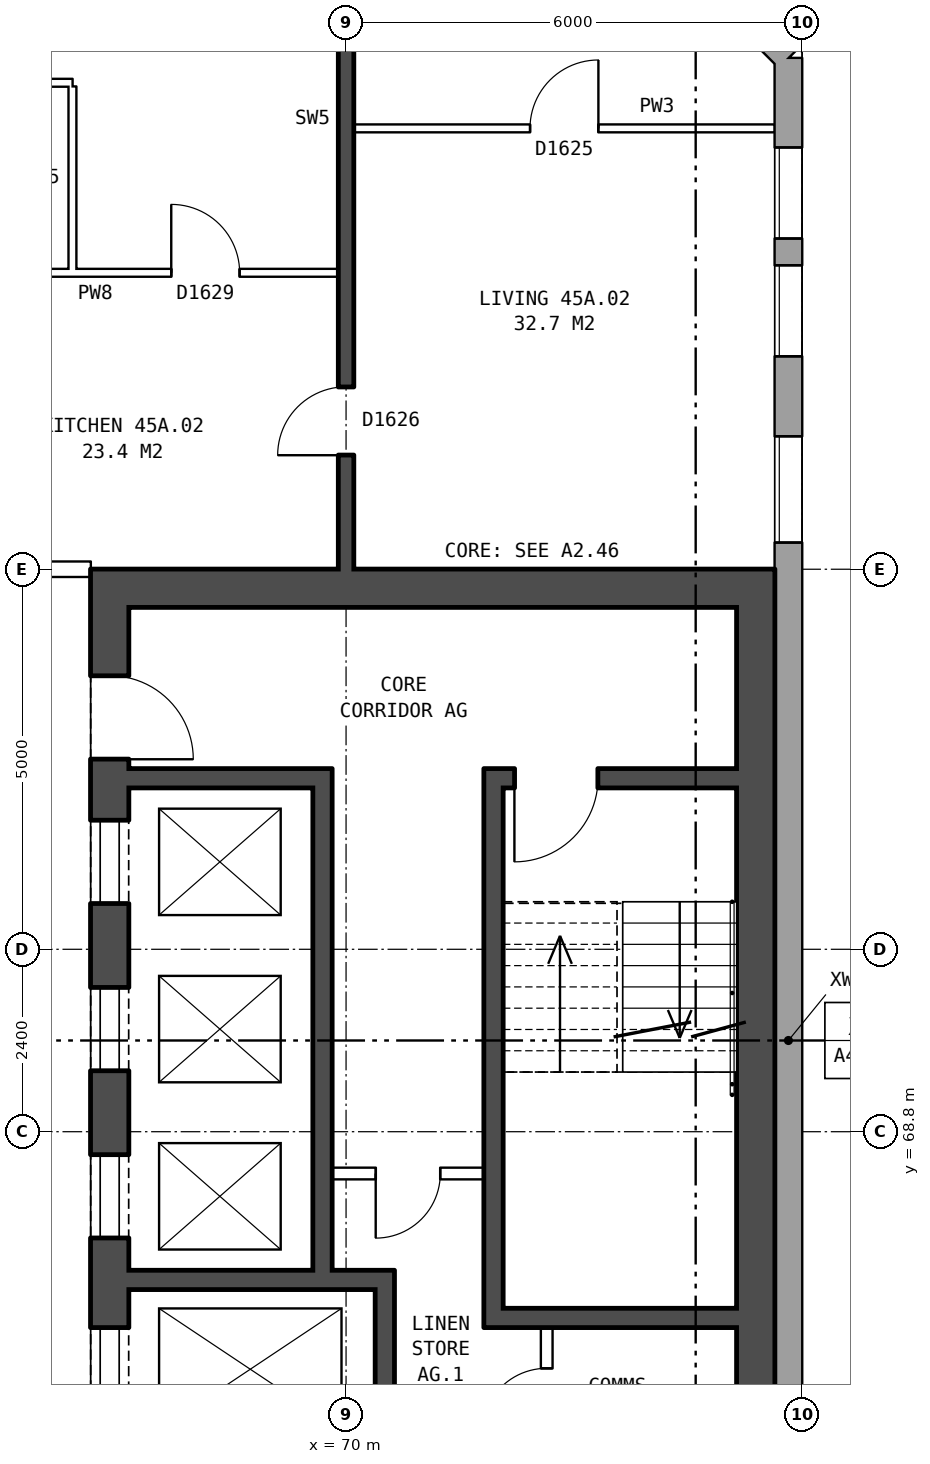
"""IFC4 building model, lengths in metres.
Left out: names, types, materials, properties, quantities, classifications, styles, units other than length and angle.
Written with IfcOpenShell. Run it as: python <this file> out.ifc"""

import sys

from ifc_helpers import new_model, si_unit, direction, frame, frame_2d, origin, place, context, subcontext, project, spatial, rectangle, extrude, element, fill, save


model = new_model("IFC4")
c1 = context("Model", 3, precision=1e-05, world=origin(), true_north=direction((0.0, 1.0)))
c2 = subcontext(c1, "Body", "Model", "MODEL_VIEW")
j1 = project(units=[si_unit("LENGTHUNIT", "METRE"), si_unit("PLANEANGLEUNIT", "RADIAN")], contexts=[c1])
p1 = place(None, origin())
s1 = spatial("IfcSite", under=j1, at=p1, CompositionType="ELEMENT")
p2 = place(p1, origin())
s2 = spatial("IfcBuilding", under=s1, at=p2, CompositionType="ELEMENT")
p3 = place(p2, frame((0.0, 0.0, 160.9)))
s3 = spatial("IfcBuildingStorey", under=s2, at=p3, CompositionType="ELEMENT", Elevation=160.9)
p4 = place(p3, frame((75.82, 57.075, 0.0), z_axis=(0.0, 0.0, 1.0), x_axis=(0.0, 1.0, 0.0)))
e1 = element("IfcWall", 1, at=p4, inside=s3, PredefinedType="STANDARD", context=c2, shape_type="SweptSolid", body=[
    extrude(rectangle(XDim=25.851, YDim=0.36, at=frame_2d((12.925, 0.0))), origin(), (0.0, 0.0, 1.0), 2.85),
])
p5 = place(p4, frame((1.075, 0.0, 0.8)))
e2 = element("IfcOpeningElement", 2, at=p5, cuts=e1, PredefinedType="OPENING", context=c2, shape_type="SweptSolid", body=[
    extrude(rectangle(XDim=1.2, YDim=1.8, at=frame_2d((0.6, 0.9))), frame((0.0, 0.19, 0.0), z_axis=(0.0, -1.0, 0.0), x_axis=(1.0, 0.0, 0.0)), (0.0, 0.0, 1.0), 0.38),
])
p6 = place(p4, frame((2.575, 0.0, 0.8)))
e3 = element("IfcOpeningElement", 3, at=p6, cuts=e1, PredefinedType="OPENING", context=c2, shape_type="SweptSolid", body=[
    extrude(rectangle(XDim=1.2, YDim=0.9, at=frame_2d((0.6, 0.45))), frame((0.0, 0.19, 0.0), z_axis=(0.0, -1.0, 0.0), x_axis=(1.0, 0.0, 0.0)), (0.0, 0.0, 1.0), 0.38),
])
p7 = place(p4, frame((19.475, 0.0, 1.7)))
e4 = element("IfcOpeningElement", 4, at=p7, cuts=e1, PredefinedType="OPENING", context=c2, shape_type="SweptSolid", body=[
    extrude(rectangle(XDim=1.4, YDim=0.9, at=frame_2d((0.7, 0.45))), frame((0.0, 0.19, 0.0), z_axis=(0.0, -1.0, 0.0), x_axis=(1.0, 0.0, 0.0)), (0.0, 0.0, 1.0), 0.38),
])
p8 = place(p4, frame((21.925, 0.0, 0.8)))
e5 = element("IfcOpeningElement", 5, at=p8, cuts=e1, PredefinedType="OPENING", context=c2, shape_type="SweptSolid", body=[
    extrude(rectangle(XDim=1.2, YDim=0.9, at=frame_2d((0.6, 0.45))), frame((0.0, 0.19, 0.0), z_axis=(0.0, -1.0, 0.0), x_axis=(1.0, 0.0, 0.0)), (0.0, 0.0, 1.0), 0.38),
])
p9 = place(p4, frame((4.975, 0.0, 1.7)))
e6 = element("IfcOpeningElement", 6, at=p9, cuts=e1, PredefinedType="OPENING", context=c2, shape_type="SweptSolid", body=[
    extrude(rectangle(XDim=1.4, YDim=0.9, at=frame_2d((0.7, 0.45))), frame((0.0, 0.19, 0.0), z_axis=(0.0, -1.0, 0.0), x_axis=(1.0, 0.0, 0.0)), (0.0, 0.0, 1.0), 0.38),
])
p10 = place(p4, frame((23.475, 0.0, 0.8)))
e7 = element("IfcOpeningElement", 7, at=p10, cuts=e1, PredefinedType="OPENING", context=c2, shape_type="SweptSolid", body=[
    extrude(rectangle(XDim=1.2, YDim=1.8, at=frame_2d((0.6, 0.9))), frame((0.0, 0.19, 0.0), z_axis=(0.0, -1.0, 0.0), x_axis=(1.0, 0.0, 0.0)), (0.0, 0.0, 1.0), 0.38),
])
p11 = place(p3, frame((75.82, 82.925, 0.0), z_axis=(0.0, 0.0, 1.0), x_axis=(-0.707106781187, 0.707106781187, 0.0)))
e8 = element("IfcWall", 8, at=p11, inside=s3, PredefinedType="STANDARD", context=c2, shape_type="SweptSolid", body=[
    extrude(rectangle(XDim=4.094, YDim=0.36, at=frame_2d((2.047, 0.0))), origin(), (0.0, 0.0, 1.0), 2.85),
])
p12 = place(p11, frame((1.247, 0.0, 0.8)))
e9 = element("IfcOpeningElement", 9, at=p12, cuts=e8, PredefinedType="OPENING", context=c2, shape_type="SweptSolid", body=[
    extrude(rectangle(XDim=1.6, YDim=1.8, at=frame_2d((0.8, 0.9))), frame((0.0, 0.19, 0.0), z_axis=(0.0, -1.0, 0.0), x_axis=(1.0, 0.0, 0.0)), (0.0, 0.0, 1.0), 0.38),
])
p13 = place(p3, frame((66.89, 63.8, 0.0), z_axis=(0.0, 0.0, 1.0), x_axis=(0.0, 1.0, 0.0)))
e10 = element("IfcWall", 10, at=p13, inside=s3, PredefinedType="SHEAR", context=c2, shape_type="SweptSolid", body=[
    extrude(rectangle(XDim=12.4, YDim=0.5, at=frame_2d((6.2, 0.0))), origin(), (0.0, 0.0, 1.0), 2.85),
])
p14 = place(p13, frame((1.325, 0.0, 0.0)))
e11 = element("IfcOpeningElement", 11, at=p14, cuts=e10, PredefinedType="OPENING", context=c2, shape_type="SweptSolid", body=[
    extrude(rectangle(XDim=1.1, YDim=2.1, at=frame_2d((0.55, 1.05))), frame((0.0, 0.26, 0.0), z_axis=(0.0, -1.0, 0.0), x_axis=(1.0, 0.0, 0.0)), (0.0, 0.0, 1.0), 0.52),
])
p15 = place(p13, frame((3.6, 0.0, 0.0)))
e12 = element("IfcOpeningElement", 12, at=p15, cuts=e10, PredefinedType="OPENING", context=c2, shape_type="SweptSolid", body=[
    extrude(rectangle(XDim=1.1, YDim=2.1, at=frame_2d((0.55, 1.05))), frame((0.0, 0.26, 0.0), z_axis=(0.0, -1.0, 0.0), x_axis=(1.0, 0.0, 0.0)), (0.0, 0.0, 1.0), 0.52),
])
p16 = place(p13, frame((5.8, 0.0, 0.0)))
e13 = element("IfcOpeningElement", 13, at=p16, cuts=e10, PredefinedType="OPENING", context=c2, shape_type="SweptSolid", body=[
    extrude(rectangle(XDim=1.1, YDim=2.1, at=frame_2d((0.55, 1.05))), frame((0.0, 0.26, 0.0), z_axis=(0.0, -1.0, 0.0), x_axis=(1.0, 0.0, 0.0)), (0.0, 0.0, 1.0), 0.52),
])
p17 = place(p13, frame((8.0, 0.0, 0.0)))
e14 = element("IfcOpeningElement", 14, at=p17, cuts=e10, PredefinedType="OPENING", context=c2, shape_type="SweptSolid", body=[
    extrude(rectangle(XDim=1.1, YDim=2.1, at=frame_2d((0.55, 1.05))), frame((0.0, 0.26, 0.0), z_axis=(0.0, -1.0, 0.0), x_axis=(1.0, 0.0, 0.0)), (0.0, 0.0, 1.0), 0.52),
])
p18 = place(p13, frame((9.9, 0.0, 0.0)))
e15 = element("IfcOpeningElement", 15, at=p18, cuts=e10, PredefinedType="OPENING", context=c2, shape_type="SweptSolid", body=[
    extrude(rectangle(XDim=1.1, YDim=2.1, at=frame_2d((0.55, 1.05))), frame((0.0, 0.26, 0.0), z_axis=(0.0, -1.0, 0.0), x_axis=(1.0, 0.0, 0.0)), (0.0, 0.0, 1.0), 0.52),
])
p19 = place(p3, frame((75.39, 63.8, 0.0), z_axis=(0.0, 0.0, 1.0), x_axis=(0.0, 1.0, 0.0)))
e16 = element("IfcWall", 16, at=p19, inside=s3, PredefinedType="SHEAR", context=c2, shape_type="SweptSolid", body=[
    extrude(rectangle(XDim=12.4, YDim=0.5, at=frame_2d((6.2, 0.0))), origin(), (0.0, 0.0, 1.0), 2.85),
])
p20 = place(p3, frame((67.14, 75.95, 0.0), z_axis=(0.0, 0.0, 1.0), x_axis=(1.0, 0.0, 0.0)))
e17 = element("IfcWall", 17, at=p20, inside=s3, PredefinedType="SHEAR", context=c2, shape_type="SweptSolid", body=[
    extrude(rectangle(XDim=8.0, YDim=0.5, at=frame_2d((4.0, 0.0))), origin(), (0.0, 0.0, 1.0), 2.85),
])
p21 = place(p3, frame((72.065, 66.35, 0.0), z_axis=(0.0, 0.0, 1.0), x_axis=(1.0, 0.0, 0.0)))
e18 = element("IfcWall", 18, at=p21, inside=s3, PredefinedType="SHEAR", context=c2, shape_type="SweptSolid", body=[
    extrude(rectangle(XDim=3.075, YDim=0.25, at=frame_2d((1.538, 0.0))), origin(), (0.0, 0.0, 1.0), 2.85),
])
p22 = place(p3, frame((67.14, 66.85, 0.0), z_axis=(0.0, 0.0, 1.0), x_axis=(1.0, 0.0, 0.0)))
e19 = element("IfcWall", 19, at=p22, inside=s3, PredefinedType="SHEAR", context=c2, shape_type="SweptSolid", body=[
    extrude(rectangle(XDim=3.495, YDim=0.25, at=frame_2d((1.748, 0.0))), origin(), (0.0, 0.0, 1.0), 2.85),
])
p23 = place(p3, frame((69.815, 68.25, 0.0), z_axis=(0.0, 0.0, 1.0), x_axis=(1.0, 0.0, 0.0)))
e20 = element("IfcWall", 20, at=p23, inside=s3, PredefinedType="PARTITIONING", context=c2, shape_type="SweptSolid", body=[
    extrude(rectangle(XDim=2.0, YDim=0.15, at=frame_2d((1.0, 0.0))), origin(), (0.0, 0.0, 1.0), 2.85),
])
p24 = place(p23, frame((0.575, 0.0, 0.0)))
e21 = element("IfcOpeningElement", 21, at=p24, cuts=e20, PredefinedType="OPENING", context=c2, shape_type="SweptSolid", body=[
    extrude(rectangle(XDim=0.85, YDim=2.1, at=frame_2d((0.425, 1.05))), frame((0.0, 0.085, 0.0), z_axis=(0.0, -1.0, 0.0), x_axis=(1.0, 0.0, 0.0)), (0.0, 0.0, 1.0), 0.17),
])
p25 = place(p3, frame((67.14, 73.45, 0.0), z_axis=(0.0, 0.0, 1.0), x_axis=(1.0, 0.0, 0.0)))
e22 = element("IfcWall", 22, at=p25, inside=s3, PredefinedType="SHEAR", context=c2, shape_type="SweptSolid", body=[
    extrude(rectangle(XDim=2.425, YDim=0.25, at=frame_2d((1.212, 0.0))), origin(), (0.0, 0.0, 1.0), 2.85),
])
p26 = place(p3, frame((72.065, 73.45, 0.0), z_axis=(0.0, 0.0, 1.0), x_axis=(1.0, 0.0, 0.0)))
e23 = element("IfcWall", 23, at=p26, inside=s3, PredefinedType="SHEAR", context=c2, shape_type="SweptSolid", body=[
    extrude(rectangle(XDim=3.075, YDim=0.25, at=frame_2d((1.538, 0.0))), origin(), (0.0, 0.0, 1.0), 2.85),
])
p27 = place(p26, frame((0.15, 0.0, 0.0)))
e24 = element("IfcOpeningElement", 24, at=p27, cuts=e23, PredefinedType="OPENING", context=c2, shape_type="SweptSolid", body=[
    extrude(rectangle(XDim=1.1, YDim=2.1, at=frame_2d((0.55, 1.05))), frame((0.0, 0.135, 0.0), z_axis=(0.0, -1.0, 0.0), x_axis=(1.0, 0.0, 0.0)), (0.0, 0.0, 1.0), 0.27),
])
p28 = place(p3, frame((69.69, 66.975, 0.0), z_axis=(0.0, 0.0, 1.0), x_axis=(0.0, 1.0, 0.0)))
e25 = element("IfcWall", 25, at=p28, inside=s3, PredefinedType="SHEAR", context=c2, shape_type="SweptSolid", body=[
    extrude(rectangle(XDim=6.6, YDim=0.25, at=frame_2d((3.3, 0.0))), origin(), (0.0, 0.0, 1.0), 2.85),
])
p29 = place(p3, frame((70.51, 64.3, 0.0), z_axis=(0.0, 0.0, 1.0), x_axis=(0.0, 1.0, 0.0)))
e26 = element("IfcWall", 26, at=p29, inside=s3, PredefinedType="SHEAR", context=c2, shape_type="SweptSolid", body=[
    extrude(rectangle(XDim=2.425, YDim=0.25, at=frame_2d((1.212, 0.0))), origin(), (0.0, 0.0, 1.0), 2.85),
])
p30 = place(p3, frame((71.94, 66.225, 0.0), z_axis=(0.0, 0.0, 1.0), x_axis=(0.0, 1.0, 0.0)))
e27 = element("IfcWall", 27, at=p30, inside=s3, PredefinedType="SHEAR", context=c2, shape_type="SweptSolid", body=[
    extrude(rectangle(XDim=7.35, YDim=0.25, at=frame_2d((3.675, 0.0))), origin(), (0.0, 0.0, 1.0), 2.85),
])
p31 = place(p3, frame((72.64, 64.3, 0.0), z_axis=(0.0, 0.0, 1.0), x_axis=(0.0, 1.0, 0.0)))
e28 = element("IfcWall", 28, at=p31, inside=s3, PredefinedType="PARTITIONING", context=c2, shape_type="SweptSolid", body=[
    extrude(rectangle(XDim=1.925, YDim=0.15, at=frame_2d((0.962, 0.0))), origin(), (0.0, 0.0, 1.0), 2.85),
])
p32 = place(p31, frame((0.538, 0.0, 0.0)))
e29 = element("IfcOpeningElement", 29, at=p32, cuts=e28, PredefinedType="OPENING", context=c2, shape_type="SweptSolid", body=[
    extrude(rectangle(XDim=0.85, YDim=2.1, at=frame_2d((0.425, 1.05))), frame((0.0, 0.085, 0.0), z_axis=(0.0, -1.0, 0.0), x_axis=(1.0, 0.0, 0.0)), (0.0, 0.0, 1.0), 0.17),
])
p33 = place(p3, frame((63.64, 76.2, 0.0), z_axis=(0.0, 0.0, 1.0), x_axis=(1.0, 0.0, 0.0)))
e30 = element("IfcWall", 30, at=p33, inside=s3, PredefinedType="PARTITIONING", context=c2, shape_type="SweptSolid", body=[
    extrude(rectangle(XDim=3.0, YDim=0.2, at=frame_2d((1.5, 0.0))), origin(), (0.0, 0.0, 1.0), 2.85),
])
p34 = place(p33, frame((1.18, 0.0, 0.0)))
e31 = element("IfcOpeningElement", 31, at=p34, cuts=e30, PredefinedType="OPENING", context=c2, shape_type="SweptSolid", body=[
    extrude(rectangle(XDim=1.0, YDim=2.1, at=frame_2d((0.5, 1.05))), frame((0.0, 0.11, 0.0), z_axis=(0.0, -1.0, 0.0), x_axis=(1.0, 0.0, 0.0)), (0.0, 0.0, 1.0), 0.22),
])
p35 = place(p3, frame((64.1, 80.1, 0.0), z_axis=(0.0, 0.0, 1.0), x_axis=(1.0, 0.0, 0.0)))
e32 = element("IfcWall", 32, at=p35, inside=s3, PredefinedType="PARTITIONING", context=c2, shape_type="SweptSolid", body=[
    extrude(rectangle(XDim=5.8, YDim=0.1, at=frame_2d((2.9, 0.0))), origin(), (0.0, 0.0, 1.0), 2.85),
])
p36 = place(p35, frame((3.6, 0.0, 0.0)))
e33 = element("IfcOpeningElement", 33, at=p36, cuts=e32, PredefinedType="OPENING", context=c2, shape_type="SweptSolid", body=[
    extrude(rectangle(XDim=0.9, YDim=2.1, at=frame_2d((0.45, 1.05))), frame((0.0, 0.06, 0.0), z_axis=(0.0, -1.0, 0.0), x_axis=(1.0, 0.0, 0.0)), (0.0, 0.0, 1.0), 0.12),
])
p37 = place(p35, frame((0.7, 0.0, 0.0)))
e34 = element("IfcOpeningElement", 34, at=p37, cuts=e32, PredefinedType="OPENING", context=c2, shape_type="SweptSolid", body=[
    extrude(rectangle(XDim=0.9, YDim=2.1, at=frame_2d((0.45, 1.05))), frame((0.0, 0.06, 0.0), z_axis=(0.0, -1.0, 0.0), x_axis=(1.0, 0.0, 0.0)), (0.0, 0.0, 1.0), 0.12),
])
p38 = place(p3, frame((70.1, 82.0, 0.0), z_axis=(0.0, 0.0, 1.0), x_axis=(1.0, 0.0, 0.0)))
e35 = element("IfcWall", 35, at=p38, inside=s3, PredefinedType="PARTITIONING", context=c2, shape_type="SweptSolid", body=[
    extrude(rectangle(XDim=5.54, YDim=0.1, at=frame_2d((2.77, 0.0))), origin(), (0.0, 0.0, 1.0), 2.85),
])
p39 = place(p38, frame((2.32, 0.0, 0.0)))
e36 = element("IfcOpeningElement", 36, at=p39, cuts=e35, PredefinedType="OPENING", context=c2, shape_type="SweptSolid", body=[
    extrude(rectangle(XDim=0.9, YDim=2.1, at=frame_2d((0.45, 1.05))), frame((0.0, 0.06, 0.0), z_axis=(0.0, -1.0, 0.0), x_axis=(1.0, 0.0, 0.0)), (0.0, 0.0, 1.0), 0.12),
])
p40 = place(p3, frame((64.1, 82.6, 0.0), z_axis=(0.0, 0.0, 1.0), x_axis=(1.0, 0.0, 0.0)))
e37 = element("IfcWall", 37, at=p40, inside=s3, PredefinedType="PARTITIONING", context=c2, shape_type="SweptSolid", body=[
    extrude(rectangle(XDim=2.3, YDim=0.1, at=frame_2d((1.15, 0.0))), origin(), (0.0, 0.0, 1.0), 2.85),
])
p41 = place(p3, frame((66.4, 80.15, 0.0), z_axis=(0.0, 0.0, 1.0), x_axis=(0.0, 1.0, 0.0)))
e38 = element("IfcWall", 38, at=p41, inside=s3, PredefinedType="PARTITIONING", context=c2, shape_type="SweptSolid", body=[
    extrude(rectangle(XDim=2.4, YDim=0.1, at=frame_2d((1.2, 0.0))), origin(), (0.0, 0.0, 1.0), 2.85),
])
p42 = place(p3, frame((70.0, 76.2, 0.0), z_axis=(0.0, 0.0, 1.0), x_axis=(0.0, 1.0, 0.0)))
e39 = element("IfcWall", 39, at=p42, inside=s3, PredefinedType="SOLIDWALL", context=c2, shape_type="SweptSolid", body=[
    extrude(rectangle(XDim=9.44, YDim=0.2, at=frame_2d((4.72, 0.0))), origin(), (0.0, 0.0, 1.0), 2.85),
])
p43 = place(p42, frame((1.5, 0.0, 0.0)))
e40 = element("IfcOpeningElement", 40, at=p43, cuts=e39, PredefinedType="OPENING", context=c2, shape_type="SweptSolid", body=[
    extrude(rectangle(XDim=0.9, YDim=2.1, at=frame_2d((0.45, 1.05))), frame((0.0, 0.11, 0.0), z_axis=(0.0, -1.0, 0.0), x_axis=(1.0, 0.0, 0.0)), (0.0, 0.0, 1.0), 0.22),
])
p44 = place(p7, origin())
e41 = element("IfcWindow", 41, at=p44, inside=s3, PartitioningType="SINGLE_PANEL", PredefinedType="WINDOW", context=c2, shape_type="SweptSolid", body=[
    extrude(rectangle(XDim=1.4, YDim=0.9, at=frame_2d((0.7, 0.45))), frame((0.0, 0.15, 0.0), z_axis=(0.0, -1.0, 0.0), x_axis=(1.0, 0.0, 0.0)), (0.0, 0.0, 1.0), 0.06),
])
fill(e4, e41)
p45 = place(p8, origin())
e42 = element("IfcWindow", 42, at=p45, inside=s3, PartitioningType="SINGLE_PANEL", PredefinedType="WINDOW", context=c2, shape_type="SweptSolid", body=[
    extrude(rectangle(XDim=1.2, YDim=0.9, at=frame_2d((0.6, 0.45))), frame((0.0, 0.15, 0.0), z_axis=(0.0, -1.0, 0.0), x_axis=(1.0, 0.0, 0.0)), (0.0, 0.0, 1.0), 0.06),
])
fill(e5, e42)
p46 = place(p14, origin())
e43 = element("IfcDoor", 43, at=p46, inside=s3, OperationType="DOUBLE_DOOR_SLIDING", PredefinedType="DOOR", context=c2, shape_type="SweptSolid", body=[
    extrude(rectangle(XDim=1.1, YDim=2.1, at=frame_2d((0.55, 1.05))), frame((0.0, -0.185, 0.0), z_axis=(0.0, -1.0, 0.0), x_axis=(1.0, 0.0, 0.0)), (0.0, 0.0, 1.0), 0.05),
])
fill(e11, e43)
p47 = place(p15, origin())
e44 = element("IfcDoor", 44, at=p47, inside=s3, OperationType="DOUBLE_DOOR_SLIDING", PredefinedType="DOOR", context=c2, shape_type="SweptSolid", body=[
    extrude(rectangle(XDim=1.1, YDim=2.1, at=frame_2d((0.55, 1.05))), frame((0.0, -0.185, 0.0), z_axis=(0.0, -1.0, 0.0), x_axis=(1.0, 0.0, 0.0)), (0.0, 0.0, 1.0), 0.05),
])
fill(e12, e44)
p48 = place(p16, origin())
e45 = element("IfcDoor", 45, at=p48, inside=s3, OperationType="DOUBLE_DOOR_SLIDING", PredefinedType="DOOR", context=c2, shape_type="SweptSolid", body=[
    extrude(rectangle(XDim=1.1, YDim=2.1, at=frame_2d((0.55, 1.05))), frame((0.0, -0.185, 0.0), z_axis=(0.0, -1.0, 0.0), x_axis=(1.0, 0.0, 0.0)), (0.0, 0.0, 1.0), 0.05),
])
fill(e13, e45)
p49 = place(p17, origin())
e46 = element("IfcDoor", 46, at=p49, inside=s3, OperationType="DOUBLE_DOOR_SLIDING", PredefinedType="DOOR", context=c2, shape_type="SweptSolid", body=[
    extrude(rectangle(XDim=1.1, YDim=2.1, at=frame_2d((0.55, 1.05))), frame((0.0, -0.185, 0.0), z_axis=(0.0, -1.0, 0.0), x_axis=(1.0, 0.0, 0.0)), (0.0, 0.0, 1.0), 0.05),
])
fill(e14, e46)
p50 = place(p18, frame((1.1, 0.0, 0.0), z_axis=(0.0, 0.0, 1.0), x_axis=(-1.0, 0.0, 0.0)))
e47 = element("IfcDoor", 47, at=p50, inside=s3, OperationType="SINGLE_SWING_RIGHT", PredefinedType="DOOR", context=c2, shape_type="SweptSolid", body=[
    extrude(rectangle(XDim=1.1, YDim=2.1, at=frame_2d((0.55, 1.05))), frame((0.0, 0.235, 0.0), z_axis=(0.0, -1.0, 0.0), x_axis=(1.0, 0.0, 0.0)), (0.0, 0.0, 1.0), 0.05),
])
fill(e15, e47)
p51 = place(p27, frame((1.1, 0.0, 0.0), z_axis=(0.0, 0.0, 1.0), x_axis=(-1.0, 0.0, 0.0)))
e48 = element("IfcDoor", 48, at=p51, inside=s3, OperationType="SINGLE_SWING_RIGHT", PredefinedType="DOOR", context=c2, shape_type="SweptSolid", body=[
    extrude(rectangle(XDim=1.1, YDim=2.1, at=frame_2d((0.55, 1.05))), frame((0.0, 0.025, 0.0), z_axis=(0.0, -1.0, 0.0), x_axis=(1.0, 0.0, 0.0)), (0.0, 0.0, 1.0), 0.05),
])
fill(e24, e48)
p52 = place(p24, frame((0.85, 0.0, 0.0), z_axis=(0.0, 0.0, 1.0), x_axis=(-1.0, 0.0, 0.0)))
e49 = element("IfcDoor", 49, at=p52, inside=s3, OperationType="SINGLE_SWING_RIGHT", PredefinedType="DOOR", context=c2, shape_type="SweptSolid", body=[
    extrude(rectangle(XDim=0.85, YDim=2.1, at=frame_2d((0.425, 1.05))), frame((0.0, 0.025, 0.0), z_axis=(0.0, -1.0, 0.0), x_axis=(1.0, 0.0, 0.0)), (0.0, 0.0, 1.0), 0.05),
])
fill(e21, e49)
p53 = place(p32, origin())
e50 = element("IfcDoor", 50, at=p53, inside=s3, OperationType="SINGLE_SWING_LEFT", PredefinedType="DOOR", context=c2, shape_type="SweptSolid", body=[
    extrude(rectangle(XDim=0.85, YDim=2.1, at=frame_2d((0.425, 1.05))), frame((0.0, 0.025, 0.0), z_axis=(0.0, -1.0, 0.0), x_axis=(1.0, 0.0, 0.0)), (0.0, 0.0, 1.0), 0.05),
])
fill(e29, e50)
p54 = place(p36, origin())
e51 = element("IfcDoor", 51, at=p54, inside=s3, OperationType="SINGLE_SWING_LEFT", PredefinedType="DOOR", context=c2, shape_type="SweptSolid", body=[
    extrude(rectangle(XDim=0.9, YDim=2.1, at=frame_2d((0.45, 1.05))), frame((0.0, 0.025, 0.0), z_axis=(0.0, -1.0, 0.0), x_axis=(1.0, 0.0, 0.0)), (0.0, 0.0, 1.0), 0.05),
])
fill(e33, e51)
p55 = place(p39, origin())
e52 = element("IfcDoor", 52, at=p55, inside=s3, OperationType="SINGLE_SWING_RIGHT", PredefinedType="DOOR", context=c2, shape_type="SweptSolid", body=[
    extrude(rectangle(XDim=0.9, YDim=2.1, at=frame_2d((0.45, 1.05))), frame((0.0, 0.025, 0.0), z_axis=(0.0, -1.0, 0.0), x_axis=(1.0, 0.0, 0.0)), (0.0, 0.0, 1.0), 0.05),
])
fill(e36, e52)
p56 = place(p43, origin())
e53 = element("IfcDoor", 53, at=p56, inside=s3, OperationType="SINGLE_SWING_LEFT", PredefinedType="DOOR", context=c2, shape_type="SweptSolid", body=[
    extrude(rectangle(XDim=0.9, YDim=2.1, at=frame_2d((0.45, 1.05))), frame((0.0, 0.025, 0.0), z_axis=(0.0, -1.0, 0.0), x_axis=(1.0, 0.0, 0.0)), (0.0, 0.0, 1.0), 0.05),
])
fill(e40, e53)
p57 = place(p10, origin())
e54 = element("IfcWindow", 54, at=p57, inside=s3, PartitioningType="SINGLE_PANEL", PredefinedType="WINDOW", context=c2, shape_type="SweptSolid", body=[
    extrude(rectangle(XDim=1.2, YDim=1.8, at=frame_2d((0.6, 0.9))), frame((0.0, 0.15, 0.0), z_axis=(0.0, -1.0, 0.0), x_axis=(1.0, 0.0, 0.0)), (0.0, 0.0, 1.0), 0.06),
])
fill(e7, e54)
save(model, sys.argv[1])
